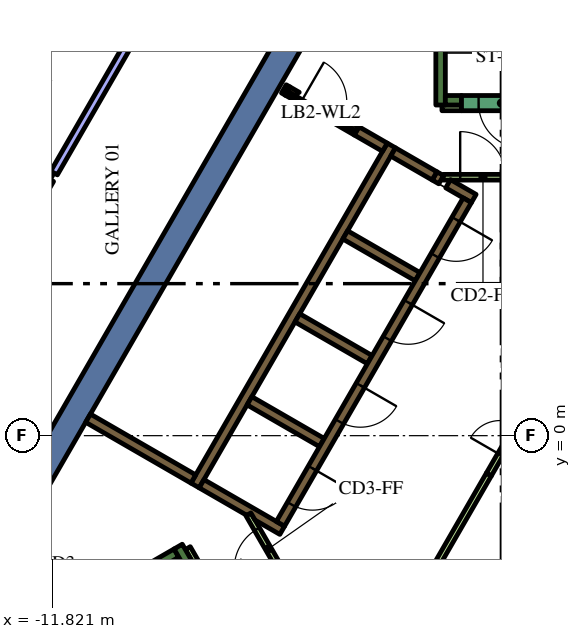
"""IFC4 building model, lengths in metres.
Left out: names, types, materials, properties, quantities, classifications, styles, units other than length and angle.
Written with IfcOpenShell. Run it as: python <this file> out.ifc"""

import sys

from ifc_helpers import new_model, si_unit, direction, frame, frame_2d, origin, place, context, subcontext, project, spatial, polyline, rectangle, outline, extrude, element, fill, save


model = new_model("IFC4")
c1 = context("Model", 3, precision=1e-05, world=origin(), true_north=direction((0.0, 1.0)))
c2 = subcontext(c1, "Body", "Model", "MODEL_VIEW")
j1 = project(units=[si_unit("LENGTHUNIT", "METRE"), si_unit("PLANEANGLEUNIT", "RADIAN")], contexts=[c1])
p1 = place(None, origin())
s1 = spatial("IfcSite", under=j1, at=p1, CompositionType="ELEMENT")
p2 = place(p1, origin())
s2 = spatial("IfcBuilding", under=s1, at=p2, CompositionType="ELEMENT")
p3 = place(p2, frame((0.0, 0.0, 235.2)))
s3 = spatial("IfcBuildingStorey", under=s2, at=p3, CompositionType="ELEMENT", Elevation=235.2)
p4 = place(p3, frame((-12.625, -1.867, 0.0), z_axis=(0.0, 0.0, 1.0), x_axis=(0.500008520515, 0.866020484407, 0.0)))
e1 = element("IfcWall", 1, at=p4, inside=s3, PredefinedType="SOLIDWALL", context=c2, shape_type="SweptSolid", body=[
    extrude(rectangle(XDim=15.859, YDim=0.7, at=frame_2d((7.929, 0.0))), origin(), (0.0, 0.0, 1.0), 4.2),
])
p5 = place(p3, frame((-1.6, 8.7, 0.0), z_axis=(0.0, 0.0, 1.0), x_axis=(0.0, 1.0, 0.0)))
e2 = element("IfcWall", 2, at=p5, inside=s3, PredefinedType="SOLIDWALL", context=c2, shape_type="SweptSolid", body=[
    extrude(rectangle(XDim=7.05, YDim=0.25, at=frame_2d((3.525, 0.0))), origin(), (0.0, 0.0, 1.0), 4.2),
])
p6 = place(p3, frame((-1.475, 8.825, 0.0), z_axis=(0.0, 0.0, 1.0), x_axis=(1.0, 0.0, 0.0)))
e3 = element("IfcWall", 3, at=p6, inside=s3, PredefinedType="SOLIDWALL", context=c2, shape_type="SweptSolid", body=[
    extrude(rectangle(XDim=0.425, YDim=0.25, at=frame_2d((0.212, 0.0))), origin(), (0.0, 0.0, 1.0), 4.2),
])
p7 = place(p3, frame((-14.44, -6.49, 0.0), z_axis=(0.0, 0.0, 1.0), x_axis=(0.866022966069, 0.500004222222, 0.0)))
e4 = element("IfcWall", 4, at=p7, inside=s3, PredefinedType="SOLIDWALL", context=c2, shape_type="SweptSolid", body=[
    extrude(rectangle(XDim=6.8, YDim=0.25, at=frame_2d((3.4, 0.0))), origin(), (0.0, 0.0, 1.0), 4.2),
])
p8 = place(p3, frame((-8.168, -3.503, 0.0), z_axis=(0.0, 0.0, 1.0), x_axis=(-0.499952099219, 0.866053057547, 0.0)))
e5 = element("IfcWall", 5, at=p8, inside=s3, PredefinedType="SOLIDWALL", context=c2, shape_type="SweptSolid", body=[
    extrude(rectangle(XDim=0.675, YDim=0.25, at=frame_2d((0.337, 0.0))), origin(), (0.0, 0.0, 1.0), 4.2),
])
p9 = place(p3, frame((-8.06, -1.311, 0.0), z_axis=(0.0, 0.0, 1.0), x_axis=(0.50000273126, 0.866023826885, 0.0)))
e6 = element("IfcWall", 6, at=p9, inside=s3, PredefinedType="SOLIDWALL", context=c2, shape_type="SweptSolid", body=[
    extrude(rectangle(XDim=10.33, YDim=0.25, at=frame_2d((5.165, 0.0))), origin(), (0.0, 0.0, 1.0), 4.2),
])
p10 = place(p3, frame((-1.758, 6.835, 0.0), z_axis=(0.0, 0.0, 1.0), x_axis=(0.865982457891, -0.500074377092, 0.0)))
e7 = element("IfcWall", 7, at=p10, inside=s3, PredefinedType="SOLIDWALL", context=c2, shape_type="SweptSolid", body=[
    extrude(rectangle(XDim=0.2, YDim=0.25, at=frame_2d((0.1, 0.0))), origin(), (0.0, 0.0, 1.0), 4.2),
])
p11 = place(p3, frame((-1.76, 6.836, 0.0), z_axis=(0.0, 0.0, 1.0), x_axis=(-0.865952863304, 0.500125622755, 0.0)))
e8 = element("IfcWall", 8, at=p11, inside=s3, PredefinedType="SOLIDWALL", context=c2, shape_type="SweptSolid", body=[
    extrude(rectangle(XDim=1.258, YDim=0.25, at=frame_2d((0.629, 0.0))), origin(), (0.0, 0.0, 1.0), 4.2),
])
p12 = place(p3, frame((-0.728, 6.24, 0.0), z_axis=(0.0, 0.0, 1.0), x_axis=(-0.865955664968, 0.500120771724, 0.0)))
e9 = element("IfcWall", 9, at=p12, inside=s3, PredefinedType="SOLIDWALL", context=c2, shape_type="SweptSolid", body=[
    extrude(rectangle(XDim=0.778, YDim=0.25, at=frame_2d((0.389, 0.0))), origin(), (0.0, 0.0, 1.0), 4.2),
])
for number, where, z_axis, x_axis in (
    (10, (-2.204, 4.182, 0.0), (0.0, 0.0, 1.0), (-0.866, 0.5, 0.0)),
    (11, (-5.369, 3.1, 0.0), (0.0, 0.0, 1.0), (0.866, -0.5, 0.0)),
    (12, (-4.724, -0.182, 0.0), (0.0, 0.0, 1.0), (-0.866, 0.5, 0.0)),
):
    element("IfcWall", number, at=place(p3, frame(where, z_axis=z_axis, x_axis=x_axis)), inside=s3, PredefinedType="SOLIDWALL", context=c2, shape_type="SweptSolid", body=[
        extrude(rectangle(XDim=2.2, YDim=0.25, at=frame_2d((1.1, 0.0))), origin(), (0.0, 0.0, 1.0), 4.2),
    ])
p13 = place(p3, origin())
e13 = element("IfcWall", 13, at=p13, inside=s3, PredefinedType="SOLIDWALL", context=c2, shape_type="SweptSolid", body=[
    extrude(outline(polyline([(-5.922, -2.257), (-5.922, -2.257), (-5.705, -2.382), (-5.83, -2.598), (-6.483, -2.221), (-6.591, -2.033), (-6.591, -2.033), (-6.7, -2.096), (-7.952, -1.373), (-7.827, -1.156), (-5.922, -2.257)])), origin(), (0.0, 0.0, 1.0), 4.2),
])
p14 = place(p3, frame((-8.106, -1.14, 0.0), z_axis=(0.0, 0.0, 1.0), x_axis=(-0.866008981251, 0.500028443584, 0.0)))
e14 = element("IfcWall", 14, at=p14, inside=s3, PredefinedType="SOLIDWALL", context=c2, shape_type="SweptSolid", body=[
    extrude(rectangle(XDim=3.2, YDim=0.25, at=frame_2d((1.6, 0.0))), origin(), (0.0, 0.0, 1.0), 4.2),
])
p15 = place(p3, frame((-5.725, 9.125, 0.0), z_axis=(0.0, 0.0, 1.0), x_axis=(0.866185586049, -0.49972245349, 0.0)))
e15 = element("IfcWall", 15, at=p15, inside=s3, PredefinedType="SOLIDWALL", context=c2, shape_type="SweptSolid", body=[
    extrude(rectangle(XDim=0.11, YDim=0.25, at=frame_2d((0.055, 0.0))), origin(), (0.0, 0.0, 1.0), 4.2),
])
p16 = place(p3, frame((-3.066, 7.59, 0.0), z_axis=(0.0, 0.0, 1.0), x_axis=(-0.866081358704, 0.49990307071, 0.0)))
e16 = element("IfcWall", 16, at=p16, inside=s3, PredefinedType="SOLIDWALL", context=c2, shape_type="SweptSolid", body=[
    extrude(rectangle(XDim=0.858, YDim=0.25, at=frame_2d((0.429, 0.0))), origin(), (0.0, 0.0, 1.0), 4.2),
])
e17 = element("IfcWall", 17, at=p13, inside=s3, PredefinedType="SOLIDWALL", context=c2, shape_type="SweptSolid", body=[
    extrude(outline(polyline([(-3.748, 8.128), (-3.813, 8.015), (-4.027, 8.139), (-4.017, 8.156), (-4.008, 8.173), (-4.0, 8.192), (-3.995, 8.21), (-3.991, 8.23), (-3.99, 8.25), (-3.99, 8.268), (-3.748, 8.128)])), origin(), (0.0, 0.0, 1.0), 4.2),
])
e18 = element("IfcWall", 18, at=p13, inside=s3, PredefinedType="SOLIDWALL", context=c2, shape_type="SweptSolid", body=[
    extrude(outline(polyline([(-5.689, 8.96), (-5.69, 8.961), (-5.565, 9.177), (-5.319, 9.035), (-5.335, 9.026), (-5.351, 9.015), (-5.366, 9.002), (-5.379, 8.988), (-5.392, 8.972), (-5.402, 8.956), (-5.412, 8.939), (-5.629, 9.064), (-5.629, 9.064), (-5.689, 8.96)])), origin(), (0.0, 0.0, 1.0), 4.2),
])
for number, where, z_axis, x_axis in (
    (19, (-8.252, -2.958, 0.0), (0.0, 0.0, 1.0), (0.5, -0.866, 0.0)),
    (20, (-1.564, 8.625, 0.0), (0.0, 0.0, 1.0), (1.0, 0.0, 0.0)),
):
    element("IfcWall", number, at=place(p3, frame(where, z_axis=z_axis, x_axis=x_axis)), inside=s3, PredefinedType="PARTITIONING", context=c2, shape_type="SweptSolid", body=[
        extrude(rectangle(XDim=0.514, YDim=0.15, at=frame_2d((0.257, 0.0))), origin(), (0.0, 0.0, 1.0), 3.45),
    ])
p17 = place(p3, frame((-1.887, -3.718, 0.0), z_axis=(0.0, 0.0, 1.0), x_axis=(0.500043732237, 0.866000153493, 0.0)))
e21 = element("IfcWall", 21, at=p17, inside=s3, PredefinedType="PARTITIONING", context=c2, shape_type="SweptSolid", body=[
    extrude(rectangle(XDim=3.114, YDim=0.15, at=frame_2d((1.557, 0.0))), origin(), (0.0, 0.0, 1.0), 3.45),
])
p18 = place(p3, frame((-0.898, 6.194, 0.0), z_axis=(0.0, 0.0, 1.0), x_axis=(-0.499996202215, -0.866027596426, 0.0)))
e22 = element("IfcWall", 22, at=p18, inside=s3, PredefinedType="SOLIDWALL", context=c2, shape_type="SweptSolid", body=[
    extrude(rectangle(XDim=9.83, YDim=0.25, at=frame_2d((4.915, 0.0))), origin(), (0.0, 0.0, 1.0), 4.2),
])
p19 = place(p18, frame((0.585, 0.0, 0.0)))
e23 = element("IfcOpeningElement", 23, at=p19, cuts=e22, PredefinedType="OPENING", context=c2, shape_type="SweptSolid", body=[
    extrude(rectangle(XDim=1.1, YDim=2.1, at=frame_2d((0.55, 1.05))), frame((0.0, 0.135, 0.0), z_axis=(0.0, -1.0, 0.0), x_axis=(1.0, 0.0, 0.0)), (0.0, 0.0, 1.0), 0.27),
])
p20 = place(p18, frame((3.105, 0.0, 0.0)))
e24 = element("IfcOpeningElement", 24, at=p20, cuts=e22, PredefinedType="OPENING", context=c2, shape_type="SweptSolid", body=[
    extrude(rectangle(XDim=1.1, YDim=2.1, at=frame_2d((0.55, 1.05))), frame((0.0, 0.135, 0.0), z_axis=(0.0, -1.0, 0.0), x_axis=(1.0, 0.0, 0.0)), (0.0, 0.0, 1.0), 0.27),
])
p21 = place(p18, frame((5.625, 0.0, 0.0)))
e25 = element("IfcOpeningElement", 25, at=p21, cuts=e22, PredefinedType="OPENING", context=c2, shape_type="SweptSolid", body=[
    extrude(rectangle(XDim=1.1, YDim=2.1, at=frame_2d((0.55, 1.05))), frame((0.0, 0.135, 0.0), z_axis=(0.0, -1.0, 0.0), x_axis=(1.0, 0.0, 0.0)), (0.0, 0.0, 1.0), 0.27),
])
p22 = place(p18, frame((8.145, 0.0, 0.0)))
e26 = element("IfcOpeningElement", 26, at=p22, cuts=e22, PredefinedType="OPENING", context=c2, shape_type="SweptSolid", body=[
    extrude(rectangle(XDim=1.1, YDim=2.1, at=frame_2d((0.55, 1.05))), frame((0.0, 0.135, 0.0), z_axis=(0.0, -1.0, 0.0), x_axis=(1.0, 0.0, 0.0)), (0.0, 0.0, 1.0), 0.27),
])
p23 = place(p3, frame((1.05, 8.75, 0.0), z_axis=(0.0, 0.0, 1.0), x_axis=(-1.0, 0.0, 0.0)))
e27 = element("IfcWall", 27, at=p23, inside=s3, PredefinedType="SOLIDWALL", context=c2, shape_type="SweptSolid", body=[
    extrude(rectangle(XDim=2.1, YDim=0.4, at=frame_2d((1.05, 0.0))), origin(), (0.0, 0.0, 1.0), 4.2),
])
p24 = place(p23, frame((0.45, 0.0, 0.0)))
e28 = element("IfcOpeningElement", 28, at=p24, cuts=e27, PredefinedType="OPENING", context=c2, shape_type="SweptSolid", body=[
    extrude(rectangle(XDim=1.2, YDim=2.1, at=frame_2d((0.6, 1.05))), frame((0.0, 0.21, 0.0), z_axis=(0.0, -1.0, 0.0), x_axis=(1.0, 0.0, 0.0)), (0.0, 0.0, 1.0), 0.42),
])
p25 = place(p3, frame((-0.33, -1.022, 0.0), z_axis=(0.0, 0.0, 1.0), x_axis=(0.500027713859, 0.866009402589, 0.0)))
e29 = element("IfcWall", 29, at=p25, inside=s3, PredefinedType="PARTITIONING", context=c2, shape_type="SweptSolid", body=[
    extrude(rectangle(XDim=2.1, YDim=0.15, at=frame_2d((1.05, 0.0))), origin(), (0.0, 0.0, 1.0), 3.45),
])
p26 = place(p25, frame((0.6, 0.0, 0.0)))
e30 = element("IfcOpeningElement", 30, at=p26, cuts=e29, PredefinedType="OPENING", context=c2, shape_type="SweptSolid", body=[
    extrude(rectangle(XDim=0.9, YDim=2.1, at=frame_2d((0.45, 1.05))), frame((0.0, 0.085, 0.0), z_axis=(0.0, -1.0, 0.0), x_axis=(1.0, 0.0, 0.0)), (0.0, 0.0, 1.0), 0.17),
])
p27 = place(p3, frame((-1.534, 6.8, 0.0), z_axis=(0.0, 0.0, 1.0), x_axis=(1.0, 0.0, 0.0)))
e31 = element("IfcWall", 31, at=p27, inside=s3, PredefinedType="PARTITIONING", context=c2, shape_type="SweptSolid", body=[
    extrude(rectangle(XDim=2.1, YDim=0.15, at=frame_2d((1.05, 0.0))), origin(), (0.0, 0.0, 1.0), 3.45),
])
p28 = place(p27, frame((0.45, 0.0, 0.0)))
e32 = element("IfcOpeningElement", 32, at=p28, cuts=e31, PredefinedType="OPENING", context=c2, shape_type="SweptSolid", body=[
    extrude(rectangle(XDim=1.2, YDim=2.1, at=frame_2d((0.6, 1.05))), frame((0.0, 0.085, 0.0), z_axis=(0.0, -1.0, 0.0), x_axis=(1.0, 0.0, 0.0)), (0.0, 0.0, 1.0), 0.17),
])
p29 = place(p3, frame((-5.606, -3.89, 0.0), z_axis=(0.0, 0.0, 1.0), x_axis=(-0.500027713859, 0.866009402589, 0.0)))
e33 = element("IfcWall", 33, at=p29, inside=s3, PredefinedType="PARTITIONING", context=c2, shape_type="SweptSolid", body=[
    extrude(rectangle(XDim=2.1, YDim=0.15, at=frame_2d((1.05, 0.0))), origin(), (0.0, 0.0, 1.0), 3.45),
])
p30 = place(p29, frame((0.45, 0.0, 0.0)))
e34 = element("IfcOpeningElement", 34, at=p30, cuts=e33, PredefinedType="OPENING", context=c2, shape_type="SweptSolid", body=[
    extrude(rectangle(XDim=1.2, YDim=2.1, at=frame_2d((0.6, 1.05))), frame((0.0, 0.085, 0.0), z_axis=(0.0, -1.0, 0.0), x_axis=(1.0, 0.0, 0.0)), (0.0, 0.0, 1.0), 0.17),
])
p31 = place(p3, frame((-5.659, 9.012, 0.0), z_axis=(0.0, 0.0, 1.0), x_axis=(0.866009402589, -0.500027713859, 0.0)))
e35 = element("IfcWall", 35, at=p31, inside=s3, PredefinedType="PARTITIONING", context=c2, shape_type="SweptSolid", body=[
    extrude(rectangle(XDim=2.1, YDim=0.12, at=frame_2d((1.05, 0.0))), origin(), (0.0, 0.0, 1.0), 3.45),
])
p32 = place(p31, frame((0.45, 0.0, 0.0)))
e36 = element("IfcOpeningElement", 36, at=p32, cuts=e35, PredefinedType="OPENING", context=c2, shape_type="SweptSolid", body=[
    extrude(rectangle(XDim=1.2, YDim=2.1, at=frame_2d((0.6, 1.05))), frame((0.0, 0.07, 0.0), z_axis=(0.0, -1.0, 0.0), x_axis=(1.0, 0.0, 0.0)), (0.0, 0.0, 1.0), 0.14),
])
p33 = place(p3, frame((-11.821, 6.825, 0.0), z_axis=(0.0, 0.0, 1.0), x_axis=(-0.866011792348, 0.500023574959, 0.0)))
e37 = element("IfcWall", 37, at=p33, inside=s3, PredefinedType="PARTITIONING", context=c2, shape_type="SweptSolid", body=[
    extrude(rectangle(XDim=5.381, YDim=0.2, at=frame_2d((2.69, 0.0))), origin(), (0.0, 0.0, 1.0), 3.45),
])
p34 = place(p3, frame((-7.061, 15.069, 0.0), z_axis=(0.0, 0.0, 1.0), x_axis=(-0.500008127286, -0.866020711443, 0.0)))
e38 = element("IfcWall", 38, at=p34, inside=s3, PredefinedType="PARTITIONING", context=c2, shape_type="SweptSolid", body=[
    extrude(rectangle(XDim=9.42, YDim=0.2, at=frame_2d((4.71, 0.0))), origin(), (0.0, 0.0, 1.0), 3.45),
])
p35 = place(p34, frame((4.2, 0.0, 0.0)))
e39 = element("IfcOpeningElement", 39, at=p35, cuts=e38, PredefinedType="OPENING", context=c2, shape_type="SweptSolid", body=[
    extrude(rectangle(XDim=1.0, YDim=2.1, at=frame_2d((0.5, 1.05))), frame((0.0, 0.11, 0.0), z_axis=(0.0, -1.0, 0.0), x_axis=(1.0, 0.0, 0.0)), (0.0, 0.0, 1.0), 0.22),
])
p36 = place(p3, frame((-11.871, 6.738, 0.0), z_axis=(0.0, 0.0, 1.0), x_axis=(-0.500019350398, -0.866014231539, 0.0)))
e40 = element("IfcWall", 40, at=p36, inside=s3, PredefinedType="PARTITIONING", context=c2, shape_type="SweptSolid", body=[
    extrude(rectangle(XDim=9.42, YDim=0.2, at=frame_2d((4.71, 0.0))), origin(), (0.0, 0.0, 1.0), 3.45),
])
p37 = place(p36, frame((4.2, 0.0, 0.0)))
e41 = element("IfcOpeningElement", 41, at=p37, cuts=e40, PredefinedType="OPENING", context=c2, shape_type="SweptSolid", body=[
    extrude(rectangle(XDim=1.0, YDim=2.1, at=frame_2d((0.5, 1.05))), frame((0.0, 0.11, 0.0), z_axis=(0.0, -1.0, 0.0), x_axis=(1.0, 0.0, 0.0)), (0.0, 0.0, 1.0), 0.22),
])
p38 = place(p19, origin())
e42 = element("IfcDoor", 42, at=p38, inside=s3, OperationType="DOUBLE_DOOR_SLIDING", PredefinedType="DOOR", context=c2, shape_type="SweptSolid", body=[
    extrude(rectangle(XDim=1.1, YDim=2.1, at=frame_2d((0.55, 1.05))), frame((0.0, 0.025, 0.0), z_axis=(0.0, -1.0, 0.0), x_axis=(1.0, 0.0, 0.0)), (0.0, 0.0, 1.0), 0.05),
])
fill(e23, e42)
p39 = place(p20, origin())
e43 = element("IfcDoor", 43, at=p39, inside=s3, OperationType="DOUBLE_DOOR_SLIDING", PredefinedType="DOOR", context=c2, shape_type="SweptSolid", body=[
    extrude(rectangle(XDim=1.1, YDim=2.1, at=frame_2d((0.55, 1.05))), frame((0.0, 0.025, 0.0), z_axis=(0.0, -1.0, 0.0), x_axis=(1.0, 0.0, 0.0)), (0.0, 0.0, 1.0), 0.05),
])
fill(e24, e43)
p40 = place(p21, origin())
e44 = element("IfcDoor", 44, at=p40, inside=s3, OperationType="DOUBLE_DOOR_SLIDING", PredefinedType="DOOR", context=c2, shape_type="SweptSolid", body=[
    extrude(rectangle(XDim=1.1, YDim=2.1, at=frame_2d((0.55, 1.05))), frame((0.0, 0.025, 0.0), z_axis=(0.0, -1.0, 0.0), x_axis=(1.0, 0.0, 0.0)), (0.0, 0.0, 1.0), 0.05),
])
fill(e25, e44)
p41 = place(p22, origin())
e45 = element("IfcDoor", 45, at=p41, inside=s3, OperationType="DOUBLE_DOOR_SLIDING", PredefinedType="DOOR", context=c2, shape_type="SweptSolid", body=[
    extrude(rectangle(XDim=1.1, YDim=2.1, at=frame_2d((0.55, 1.05))), frame((0.0, 0.025, 0.0), z_axis=(0.0, -1.0, 0.0), x_axis=(1.0, 0.0, 0.0)), (0.0, 0.0, 1.0), 0.05),
])
fill(e26, e45)
p42 = place(p24, origin())
e46 = element("IfcDoor", 46, at=p42, inside=s3, OperationType="SINGLE_SWING_LEFT", PredefinedType="DOOR", context=c2, shape_type="SweptSolid", body=[
    extrude(rectangle(XDim=1.2, YDim=2.1, at=frame_2d((0.6, 1.05))), frame((0.0, 0.025, 0.0), z_axis=(0.0, -1.0, 0.0), x_axis=(1.0, 0.0, 0.0)), (0.0, 0.0, 1.0), 0.05),
])
fill(e28, e46)
p43 = place(p26, origin())
e47 = element("IfcDoor", 47, at=p43, inside=s3, OperationType="SINGLE_SWING_LEFT", PredefinedType="DOOR", context=c2, shape_type="SweptSolid", body=[
    extrude(rectangle(XDim=0.9, YDim=2.1, at=frame_2d((0.45, 1.05))), frame((0.0, 0.025, 0.0), z_axis=(0.0, -1.0, 0.0), x_axis=(1.0, 0.0, 0.0)), (0.0, 0.0, 1.0), 0.05),
])
fill(e30, e47)
p44 = place(p28, origin())
e48 = element("IfcDoor", 48, at=p44, inside=s3, OperationType="SINGLE_SWING_LEFT", PredefinedType="DOOR", context=c2, shape_type="SweptSolid", body=[
    extrude(rectangle(XDim=1.2, YDim=2.1, at=frame_2d((0.6, 1.05))), frame((0.0, 0.025, 0.0), z_axis=(0.0, -1.0, 0.0), x_axis=(1.0, 0.0, 0.0)), (0.0, 0.0, 1.0), 0.05),
])
fill(e32, e48)
p45 = place(p30, origin())
e49 = element("IfcDoor", 49, at=p45, inside=s3, OperationType="SINGLE_SWING_LEFT", PredefinedType="DOOR", context=c2, shape_type="SweptSolid", body=[
    extrude(rectangle(XDim=1.2, YDim=2.1, at=frame_2d((0.6, 1.05))), frame((0.0, 0.025, 0.0), z_axis=(0.0, -1.0, 0.0), x_axis=(1.0, 0.0, 0.0)), (0.0, 0.0, 1.0), 0.05),
])
fill(e34, e49)
p46 = place(p32, origin())
e50 = element("IfcDoor", 50, at=p46, inside=s3, OperationType="SINGLE_SWING_LEFT", PredefinedType="DOOR", context=c2, shape_type="SweptSolid", body=[
    extrude(rectangle(XDim=1.2, YDim=2.1, at=frame_2d((0.6, 1.05))), frame((0.0, 0.025, 0.0), z_axis=(0.0, -1.0, 0.0), x_axis=(1.0, 0.0, 0.0)), (0.0, 0.0, 1.0), 0.05),
])
fill(e36, e50)
save(model, sys.argv[1])
